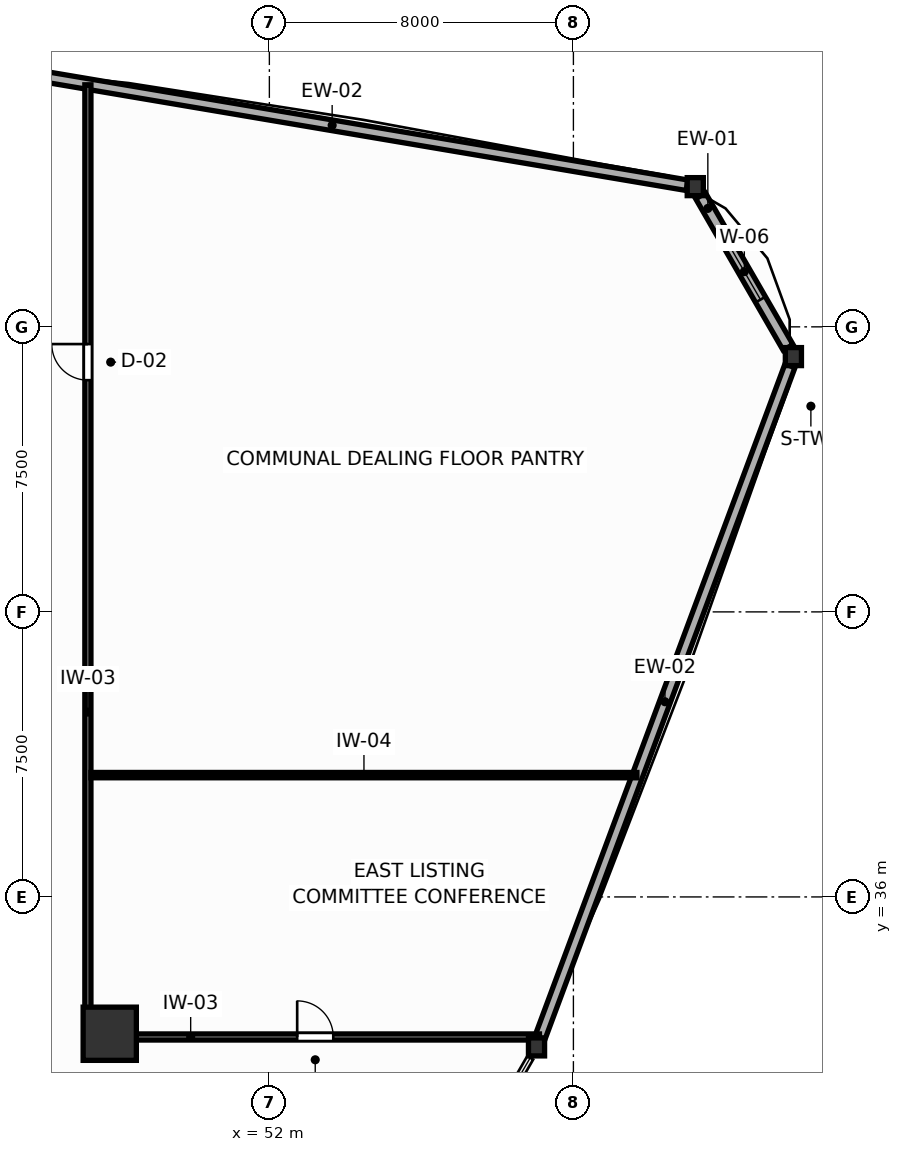
"""IFC4 building model, lengths in metres.
Left out: names, types, materials, properties, quantities, classifications, styles, units other than length and angle.
Written with IfcOpenShell. Run it as: python <this file> out.ifc"""

import sys

from ifc_helpers import new_model, si_unit, direction, frame, frame_2d, origin, origin_2d, place, context, subcontext, project, spatial, rectangle, i_section, extrude, source, transform, mapped, element, fill, save


model = new_model("IFC4")
c1 = context("Model", 3, precision=1e-05, world=origin(), true_north=direction((0.0, 1.0)))
c2 = subcontext(c1, "Body", "Model", "MODEL_VIEW")
j1 = project(units=[si_unit("LENGTHUNIT", "METRE"), si_unit("PLANEANGLEUNIT", "RADIAN")], contexts=[c1])
p1 = place(None, origin())
s1 = spatial("IfcSite", under=j1, at=p1, CompositionType="ELEMENT")
p2 = place(p1, origin())
s2 = spatial("IfcBuilding", under=s1, at=p2, CompositionType="ELEMENT")
p3 = place(p2, frame((0.0, 0.0, 31.8)))
s3 = spatial("IfcBuildingStorey", under=s2, at=p3, CompositionType="ELEMENT", Elevation=31.8)
m1 = source(origin(), c2, "Body", "SweptSolid", [
    extrude(rectangle(XDim=1.4, YDim=1.4, at=origin_2d()), origin(), (0.0, 0.0, 1.0), 3.9),
])
p4 = place(p3, frame((47.8, 32.4, 0.0), z_axis=(0.0, 0.0, 1.0), x_axis=(1.0, 0.0, 0.0)))
e1 = element("IfcColumn", 1, at=p4, inside=s3, PredefinedType="COLUMN", context=c2, shape_type="MappedRepresentation", body=[
    mapped(m1, transform((0.0, 0.0, 0.0), scale=1.0)),
])
m2 = source(origin(), c2, "Body", "SweptSolid", [
    extrude(i_section(OverallWidth=0.424, OverallDepth=0.474, WebThickness=0.045, FlangeThickness=0.072, FilletRadius=0.015, at=origin_2d()), origin(), (0.0, 0.0, 1.0), 3.9),
])
for number, where, z_axis, x_axis in (
    (2, (65.789, 50.217, 0.0), (0.0, 0.0, 1.0), (1.0, 0.0, 0.0)),
    (3, (63.207, 54.689, 0.0), (0.0, 0.0, 1.0), (1.0, 0.0, 0.0)),
    (4, (59.03, 32.054, 0.0), (0.0, 0.0, 1.0), (1.0, 0.0, 0.0)),
):
    element("IfcColumn", number, at=place(p3, frame(where, z_axis=z_axis, x_axis=x_axis)), inside=s3, PredefinedType="COLUMN", context=c2, shape_type="MappedRepresentation", body=[
        mapped(m2, transform((0.0, 0.0, 0.0), scale=1.0)),
    ])
p5 = place(p3, frame((65.649, 50.459, 0.0), z_axis=(0.0, 0.0, 1.0), x_axis=(-0.500022295776, 0.86601253093, 0.0)))
e5 = element("IfcWall", 5, at=p5, inside=s3, PredefinedType="SOLIDWALL", context=c2, shape_type="SweptSolid", body=[
    extrude(rectangle(XDim=4.605, YDim=0.3, at=frame_2d((2.302, 0.0))), origin(), (0.0, 0.0, 1.0), 2.08),
])
p6 = place(p5, frame((1.452, 0.0, 0.75)))
e6 = element("IfcOpeningElement", 6, at=p6, cuts=e5, PredefinedType="OPENING", context=c2, shape_type="SweptSolid", body=[
    extrude(rectangle(XDim=1.7, YDim=1.15, at=frame_2d((0.85, 0.575))), frame((0.0, 0.16, 0.0), z_axis=(0.0, -1.0, 0.0), x_axis=(1.0, 0.0, 0.0)), (0.0, 0.0, 1.0), 0.32),
])
p7 = place(p3, frame((62.99, 54.726, 0.0), z_axis=(0.0, 0.0, 1.0), x_axis=(-0.98603202958, 0.166555806393, 0.0)))
e7 = element("IfcWall", 7, at=p7, inside=s3, PredefinedType="SOLIDWALL", context=c2, shape_type="SweptSolid", body=[
    extrude(rectangle(XDim=18.94, YDim=0.28, at=frame_2d((9.47, 0.0))), origin(), (0.0, 0.0, 1.0), 2.08),
])
p8 = place(p3, frame((59.12, 32.296, 0.0), z_axis=(0.0, 0.0, 1.0), x_axis=(0.348763587367, 0.937210734108, 0.0)))
e8 = element("IfcWall", 8, at=p8, inside=s3, PredefinedType="SOLIDWALL", context=c2, shape_type="SweptSolid", body=[
    extrude(rectangle(XDim=18.863, YDim=0.28, at=frame_2d((9.432, 0.0))), origin(), (0.0, 0.0, 1.0), 2.08),
])
p9 = place(p3, frame((47.225, 32.31, 0.0), z_axis=(0.0, 0.0, 1.0), x_axis=(0.0, 1.0, 0.0)))
e9 = element("IfcWall", 9, at=p9, inside=s3, PredefinedType="PARTITIONING", context=c2, shape_type="SweptSolid", body=[
    extrude(rectangle(XDim=25.059, YDim=0.16, at=frame_2d((12.529, 0.0))), origin(), (0.0, 0.0, 1.0), 3.68),
])
p10 = place(p9, frame((17.287, 0.0, 0.0)))
e10 = element("IfcOpeningElement", 10, at=p10, cuts=e9, PredefinedType="OPENING", context=c2, shape_type="SweptSolid", body=[
    extrude(rectangle(XDim=0.95, YDim=2.05, at=frame_2d((0.475, 1.025))), frame((0.0, 0.09, 0.0), z_axis=(0.0, -1.0, 0.0), x_axis=(1.0, 0.0, 0.0)), (0.0, 0.0, 1.0), 0.18),
])
p11 = place(p3, frame((47.307, 32.315, 0.0), z_axis=(0.0, 0.0, 1.0), x_axis=(1.0, 0.0, 0.0)))
e11 = element("IfcWall", 11, at=p11, inside=s3, PredefinedType="PARTITIONING", context=c2, shape_type="SweptSolid", body=[
    extrude(rectangle(XDim=11.8, YDim=0.16, at=frame_2d((5.9, 0.0))), origin(), (0.0, 0.0, 1.0), 2.24),
])
p12 = place(p11, frame((5.425, 0.0, 0.0)))
e12 = element("IfcOpeningElement", 12, at=p12, cuts=e11, PredefinedType="OPENING", context=c2, shape_type="SweptSolid", body=[
    extrude(rectangle(XDim=0.95, YDim=2.05, at=frame_2d((0.475, 1.025))), frame((0.0, 0.09, 0.0), z_axis=(0.0, -1.0, 0.0), x_axis=(1.0, 0.0, 0.0)), (0.0, 0.0, 1.0), 0.18),
])
p13 = place(p3, frame((47.307, 39.205, 0.0), z_axis=(0.0, 0.0, 1.0), x_axis=(1.0, 0.0, 0.0)))
e13 = element("IfcWall", 13, at=p13, inside=s3, PredefinedType="PARTITIONING", context=c2, shape_type="SweptSolid", body=[
    extrude(rectangle(XDim=14.364, YDim=0.14, at=frame_2d((7.182, 0.0))), origin(), (0.0, 0.0, 1.0), 3.68),
])
p14 = place(p6, origin())
e14 = element("IfcWindow", 14, at=p14, inside=s3, PartitioningType="SINGLE_PANEL", PredefinedType="WINDOW", context=c2, shape_type="SweptSolid", body=[
    extrude(rectangle(XDim=1.7, YDim=1.15, at=frame_2d((0.85, 0.575))), frame((0.0, 0.03, 0.0), z_axis=(0.0, -1.0, 0.0), x_axis=(1.0, 0.0, 0.0)), (0.0, 0.0, 1.0), 0.06),
])
fill(e6, e14)
p15 = place(p10, origin())
e15 = element("IfcDoor", 15, at=p15, inside=s3, OperationType="SINGLE_SWING_RIGHT", PredefinedType="DOOR", context=c2, shape_type="SweptSolid", body=[
    extrude(rectangle(XDim=0.95, YDim=2.05, at=frame_2d((0.475, 1.025))), frame((0.0, 0.025, 0.0), z_axis=(0.0, -1.0, 0.0), x_axis=(1.0, 0.0, 0.0)), (0.0, 0.0, 1.0), 0.05),
])
fill(e10, e15)
p16 = place(p12, origin())
e16 = element("IfcDoor", 16, at=p16, inside=s3, OperationType="SINGLE_SWING_LEFT", PredefinedType="DOOR", context=c2, shape_type="SweptSolid", body=[
    extrude(rectangle(XDim=0.95, YDim=2.05, at=frame_2d((0.475, 1.025))), frame((0.0, 0.025, 0.0), z_axis=(0.0, -1.0, 0.0), x_axis=(1.0, 0.0, 0.0)), (0.0, 0.0, 1.0), 0.05),
])
fill(e12, e16)
save(model, sys.argv[1])
